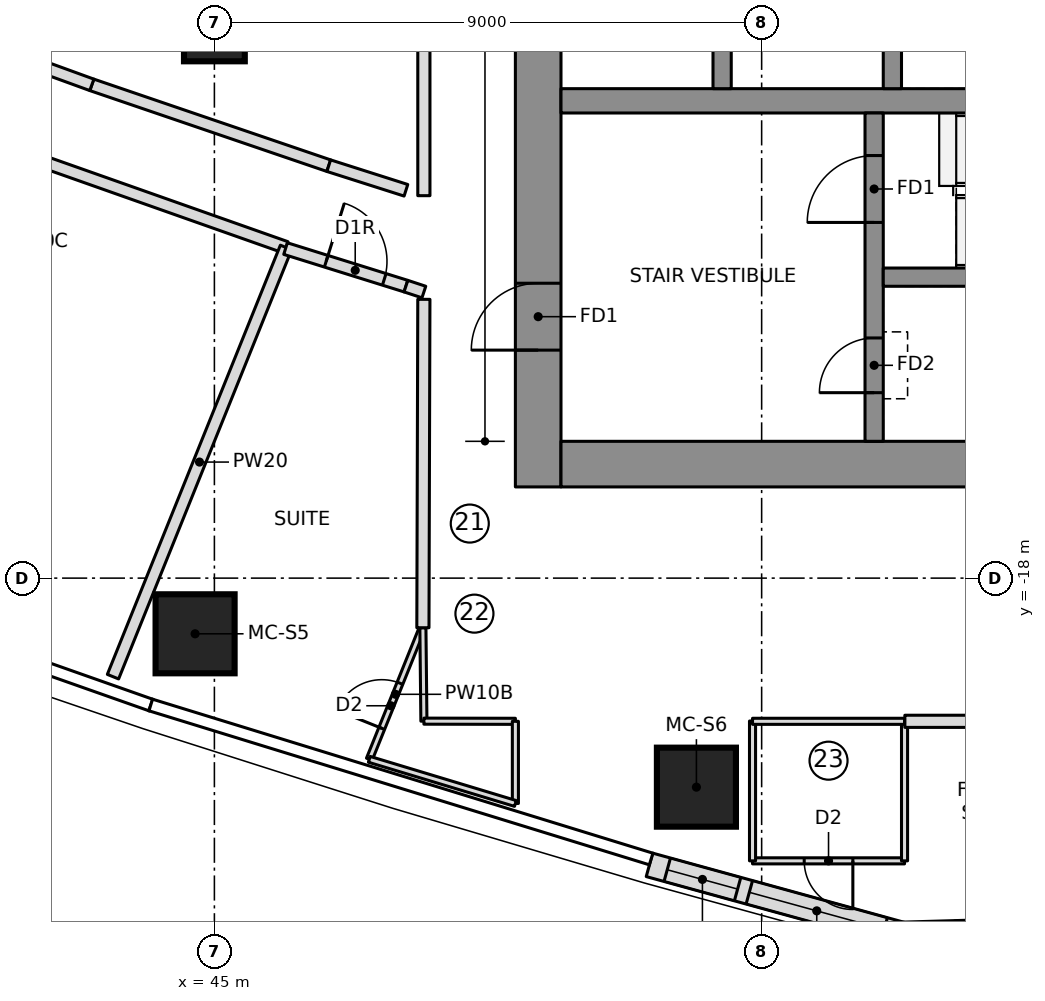
"""IFC4 building model, lengths in metres.
Left out: names, types, materials, properties, quantities, classifications, styles, units other than length and angle.
Written with IfcOpenShell. Run it as: python <this file> out.ifc"""

import sys

from ifc_helpers import new_model, si_unit, direction, frame, frame_2d, origin, origin_2d, place, context, subcontext, project, spatial, polyline, rectangle, outline, extrude, element, fill, save


model = new_model("IFC4")
c1 = context("Model", 3, precision=1e-05, world=origin(), true_north=direction((0.0, 1.0)))
c2 = subcontext(c1, "Body", "Model", "MODEL_VIEW")
j1 = project(units=[si_unit("LENGTHUNIT", "METRE"), si_unit("PLANEANGLEUNIT", "RADIAN")], contexts=[c1])
p1 = place(None, origin())
s1 = spatial("IfcSite", under=j1, at=p1, CompositionType="ELEMENT")
p2 = place(p1, origin())
s2 = spatial("IfcBuilding", under=s1, at=p2, CompositionType="ELEMENT")
p3 = place(p2, frame((0.0, 0.0, 196.8)))
s3 = spatial("IfcBuildingStorey", under=s2, at=p3, CompositionType="ELEMENT", Elevation=196.8)
p4 = place(p3, frame((50.325, -16.5, 0.0), z_axis=(0.0, 0.0, 1.0), x_axis=(0.0, 1.0, 0.0)))
e1 = element("IfcWall", 1, at=p4, inside=s3, PredefinedType="SHEAR", context=c2, shape_type="SweptSolid", body=[
    extrude(rectangle(XDim=9.85, YDim=0.75, at=frame_2d((4.925, 0.0))), origin(), (0.0, 0.0, 1.0), 3.55),
])
p5 = place(p4, frame((2.25, 0.0, 0.0)))
e2 = element("IfcOpeningElement", 2, at=p5, cuts=e1, PredefinedType="OPENING", context=c2, shape_type="SweptSolid", body=[
    extrude(rectangle(XDim=1.1, YDim=2.1, at=frame_2d((0.55, 1.05))), frame((0.0, 0.385, 0.0), z_axis=(0.0, -1.0, 0.0), x_axis=(1.0, 0.0, 0.0)), (0.0, 0.0, 1.0), 0.77),
])
p6 = place(p3, frame((50.7, -16.125, 0.0), z_axis=(0.0, 0.0, 1.0), x_axis=(1.0, 0.0, 0.0)))
e3 = element("IfcWall", 3, at=p6, inside=s3, PredefinedType="SHEAR", context=c2, shape_type="SweptSolid", body=[
    extrude(rectangle(XDim=13.77, YDim=0.75, at=frame_2d((6.885, 0.0))), origin(), (0.0, 0.0, 1.0), 3.55),
])
p7 = place(p3, frame((50.7, -10.15, 0.0), z_axis=(0.0, 0.0, 1.0), x_axis=(1.0, 0.0, 0.0)))
e4 = element("IfcWall", 4, at=p7, inside=s3, PredefinedType="SHEAR", context=c2, shape_type="SweptSolid", body=[
    extrude(rectangle(XDim=13.02, YDim=0.4, at=frame_2d((6.51, 0.0))), origin(), (0.0, 0.0, 1.0), 3.55),
])
for number, where, z_axis, x_axis in (
    (5, (53.35, -9.95, 0.0), (0.0, 0.0, 1.0), (0.0, 1.0, 0.0)),
    (6, (56.15, -9.95, 0.0), (0.0, 0.0, 1.0), (0.0, 1.0, 0.0)),
):
    element("IfcWall", number, at=place(p3, frame(where, z_axis=z_axis, x_axis=x_axis)), inside=s3, PredefinedType="SHEAR", context=c2, shape_type="SweptSolid", body=[
        extrude(rectangle(XDim=3.0, YDim=0.3, at=frame_2d((1.5, 0.0))), origin(), (0.0, 0.0, 1.0), 3.55),
    ])
p8 = place(p3, frame((55.85, -15.75, 0.0), z_axis=(0.0, 0.0, 1.0), x_axis=(0.0, 1.0, 0.0)))
e7 = element("IfcWall", 7, at=p8, inside=s3, PredefinedType="SHEAR", context=c2, shape_type="SweptSolid", body=[
    extrude(rectangle(XDim=5.4, YDim=0.3, at=frame_2d((2.7, 0.0))), origin(), (0.0, 0.0, 1.0), 3.55),
])
p9 = place(p8, frame((3.6, 0.0, 0.0)))
e8 = element("IfcOpeningElement", 8, at=p9, cuts=e7, PredefinedType="OPENING", context=c2, shape_type="SweptSolid", body=[
    extrude(rectangle(XDim=1.1, YDim=2.1, at=frame_2d((0.55, 1.05))), frame((0.0, 0.16, 0.0), z_axis=(0.0, -1.0, 0.0), x_axis=(1.0, 0.0, 0.0)), (0.0, 0.0, 1.0), 0.32),
])
p10 = place(p8, frame((0.8, 0.0, 0.0)))
e9 = element("IfcOpeningElement", 9, at=p10, cuts=e7, PredefinedType="OPENING", context=c2, shape_type="SweptSolid", body=[
    extrude(rectangle(XDim=0.9, YDim=2.1, at=frame_2d((0.45, 1.05))), frame((0.0, 0.16, 0.0), z_axis=(0.0, -1.0, 0.0), x_axis=(1.0, 0.0, 0.0)), (0.0, 0.0, 1.0), 0.32),
])
p11 = place(p3, frame((56.0, -13.05, 0.0), z_axis=(0.0, 0.0, 1.0), x_axis=(1.0, 0.0, 0.0)))
e10 = element("IfcWall", 10, at=p11, inside=s3, PredefinedType="SHEAR", context=c2, shape_type="SweptSolid", body=[
    extrude(rectangle(XDim=7.72, YDim=0.3, at=frame_2d((3.86, 0.0))), origin(), (0.0, 0.0, 1.0), 3.55),
])
for number, where, z_axis, x_axis in (
    (11, (44.683, -18.916, 0.0), (0.0, 0.0, 1.0), (1.0, 0.0, 0.0)),
    (12, (52.927, -21.438, 0.0), (0.0, 0.0, 1.0), (1.0, 0.0, 0.0)),
):
    element("IfcColumn", number, at=place(p3, frame(where, z_axis=z_axis, x_axis=x_axis)), inside=s3, PredefinedType="COLUMN", context=c2, shape_type="SweptSolid", body=[
        extrude(rectangle(XDim=1.3, YDim=1.3, at=origin_2d()), origin(), (0.0, 0.0, 1.0), 3.55),
    ])
p12 = place(p3, frame((45.0, -9.0, 0.0), z_axis=(0.0, 0.0, 1.0), x_axis=(1.0, 0.0, 0.0)))
e13 = element("IfcColumn", 13, at=p12, inside=s3, PredefinedType="COLUMN", context=c2, shape_type="SweptSolid", body=[
    extrude(rectangle(XDim=1.0, YDim=1.0, at=origin_2d()), origin(), (0.0, 0.0, 1.0), 3.55),
])
p13 = place(p3, frame((52.155, -22.716, 0.0), z_axis=(0.0, 0.0, 1.0), x_axis=(0.964205755089, -0.265155165617, 0.0)))
e14 = element("IfcWall", 14, at=p13, inside=s3, PredefinedType="NOTDEFINED", context=c2, shape_type="SweptSolid", body=[
    extrude(outline(polyline([(0.0, -0.2), (4.337, -0.2), (4.277, 0.2), (0.0, 0.2), (0.0, -0.2)])), origin(), (0.0, 0.0, 1.0), 3.25),
])
p14 = place(p13, frame((0.303, 0.0, 0.9)))
e15 = element("IfcOpeningElement", 15, at=p14, cuts=e14, PredefinedType="OPENING", context=c2, shape_type="SweptSolid", body=[
    extrude(rectangle(XDim=1.2, YDim=1.8, at=frame_2d((0.6, 0.9))), frame((0.0, 0.21, 0.0), z_axis=(0.0, -1.0, 0.0), x_axis=(1.0, 0.0, 0.0)), (0.0, 0.0, 1.0), 0.42),
])
p15 = place(p13, frame((1.704, 0.0, 0.9)))
e16 = element("IfcOpeningElement", 16, at=p15, cuts=e14, PredefinedType="OPENING", context=c2, shape_type="SweptSolid", body=[
    extrude(rectangle(XDim=2.3, YDim=1.8, at=frame_2d((1.15, 0.9))), frame((0.0, 0.21, 0.0), z_axis=(0.0, -1.0, 0.0), x_axis=(1.0, 0.0, 0.0)), (0.0, 0.0, 1.0), 0.42),
])
p16 = place(p3, frame((56.308, -23.858, 0.0), z_axis=(0.0, 0.0, 1.0), x_axis=(0.999587920197, 0.028705222472, 0.0)))
e17 = element("IfcWall", 17, at=p16, inside=s3, PredefinedType="NOTDEFINED", context=c2, shape_type="SweptSolid", body=[
    extrude(outline(polyline([(-0.03, -0.2), (3.989, -0.2), (3.87, 0.2), (0.03, 0.2), (-0.03, -0.2)])), origin(), (0.0, 0.0, 1.0), 3.25),
])
p17 = place(p16, frame((0.865, 0.0, 0.6)))
e18 = element("IfcOpeningElement", 18, at=p17, cuts=e17, PredefinedType="OPENING", context=c2, shape_type="SweptSolid", body=[
    extrude(outline(polyline([(0.0, 1.35), (0.084, 1.771), (0.322, 2.128), (0.679, 2.366), (1.1, 2.45), (1.521, 2.366), (1.878, 2.128), (2.116, 1.771), (2.2, 1.35), (2.2, 1.1), (2.116, 0.679), (1.878, 0.322), (1.521, 0.084), (1.1, 0.0), (0.679, 0.084), (0.322, 0.322), (0.084, 0.679), (0.0, 1.1), (0.0, 1.35)])), frame((0.0, 0.21, 0.0), z_axis=(0.0, -1.0, 0.0), x_axis=(1.0, 0.0, 0.0)), (0.0, 0.0, 1.0), 0.42),
])
p18 = place(p3, frame((56.35, -22.65, 0.0), z_axis=(0.0, 0.0, 1.0), x_axis=(-1.0, 0.0, 0.0)))
e19 = element("IfcWall", 19, at=p18, inside=s3, PredefinedType="PARTITIONING", context=c2, shape_type="SweptSolid", body=[
    extrude(rectangle(XDim=2.5, YDim=0.1, at=frame_2d((1.25, 0.0))), origin(), (0.0, 0.0, 1.0), 3.25),
])
p19 = place(p18, frame((0.85, 0.0, 0.0)))
e20 = element("IfcOpeningElement", 20, at=p19, cuts=e19, PredefinedType="OPENING", context=c2, shape_type="SweptSolid", body=[
    extrude(rectangle(XDim=0.8, YDim=2.1, at=frame_2d((0.4, 1.05))), frame((0.0, 0.06, 0.0), z_axis=(0.0, -1.0, 0.0), x_axis=(1.0, 0.0, 0.0)), (0.0, 0.0, 1.0), 0.12),
])
for number, where, z_axis, x_axis in (
    (21, (53.85, -22.65, 0.0), (0.0, 0.0, 1.0), (0.0, 1.0, 0.0)),
    (22, (56.35, -20.35, 0.0), (0.0, 0.0, 1.0), (0.0, -1.0, 0.0)),
):
    element("IfcWall", number, at=place(p3, frame(where, z_axis=z_axis, x_axis=x_axis)), inside=s3, PredefinedType="PARTITIONING", context=c2, shape_type="SweptSolid", body=[
        extrude(rectangle(XDim=2.3, YDim=0.1, at=frame_2d((1.15, 0.0))), origin(), (0.0, 0.0, 1.0), 3.25),
    ])
p20 = place(p3, frame((37.872, -9.628, 0.0), z_axis=(0.0, 0.0, 1.0), x_axis=(0.9429299378, -0.332991189675, 0.0)))
e23 = element("IfcWall", 23, at=p20, inside=s3, PredefinedType="PARTITIONING", context=c2, shape_type="SweptSolid", body=[
    extrude(rectangle(XDim=8.808, YDim=0.2, at=frame_2d((4.404, 0.0))), origin(), (0.0, 0.0, 1.0), 3.25),
])
p21 = place(p20, frame((3.05, 0.0, 0.0)))
e24 = element("IfcOpeningElement", 24, at=p21, cuts=e23, PredefinedType="OPENING", context=c2, shape_type="SweptSolid", body=[
    extrude(rectangle(XDim=1.5, YDim=2.1, at=frame_2d((0.75, 1.05))), frame((0.0, 0.11, 0.0), z_axis=(0.0, -1.0, 0.0), x_axis=(1.0, 0.0, 0.0)), (0.0, 0.0, 1.0), 0.22),
])
p22 = place(p3, frame((43.332, -19.621, 0.0), z_axis=(0.0, 0.0, 1.0), x_axis=(0.373905590149, 0.927466770108, 0.0)))
e25 = element("IfcWall", 25, at=p22, inside=s3, PredefinedType="PARTITIONING", context=c2, shape_type="SweptSolid", body=[
    extrude(rectangle(XDim=7.611, YDim=0.2, at=frame_2d((3.806, 0.0))), origin(), (0.0, 0.0, 1.0), 3.25),
])
p23 = place(p3, frame((47.547, -20.98, 0.0), z_axis=(0.0, 0.0, 1.0), x_axis=(0.373908119057, 0.927465750582, 0.0)))
e26 = element("IfcWall", 26, at=p23, inside=s3, PredefinedType="PARTITIONING", context=c2, shape_type="SweptSolid", body=[
    extrude(rectangle(XDim=2.306, YDim=0.1, at=frame_2d((1.153, 0.0))), origin(), (0.0, 0.0, 1.0), 3.25),
])
p24 = place(p23, frame((0.55, 0.0, 0.0)))
e27 = element("IfcOpeningElement", 27, at=p24, cuts=e26, PredefinedType="OPENING", context=c2, shape_type="SweptSolid", body=[
    extrude(rectangle(XDim=0.8, YDim=2.1, at=frame_2d((0.4, 1.05))), frame((0.0, 0.06, 0.0), z_axis=(0.0, -1.0, 0.0), x_axis=(1.0, 0.0, 0.0)), (0.0, 0.0, 1.0), 0.12),
])
p25 = place(p3, frame((46.881, -11.217, 0.0), z_axis=(0.0, 0.0, 1.0), x_axis=(-0.946436071896, 0.322891253852, 0.0)))
e28 = element("IfcWall", 28, at=p25, inside=s3, PredefinedType="PARTITIONING", context=c2, shape_type="SweptSolid", body=[
    extrude(rectangle(XDim=4.117, YDim=0.2, at=frame_2d((2.059, 0.0))), origin(), (0.0, 0.0, 1.0), 3.25),
])
p26 = place(p3, frame((42.984, -9.887, 0.0), z_axis=(0.0, 0.0, 1.0), x_axis=(-0.939726274687, 0.341927665833, 0.0)))
e29 = element("IfcWall", 29, at=p26, inside=s3, PredefinedType="PARTITIONING", context=c2, shape_type="SweptSolid", body=[
    extrude(rectangle(XDim=2.973, YDim=0.2, at=frame_2d((1.487, 0.0))), origin(), (0.0, 0.0, 1.0), 3.25),
])
p27 = place(p3, frame((56.355, -20.355, 0.0), z_axis=(0.0, 0.0, 1.0), x_axis=(1.0, 0.0, 0.0)))
e30 = element("IfcWall", 30, at=p27, inside=s3, PredefinedType="PARTITIONING", context=c2, shape_type="SweptSolid", body=[
    extrude(rectangle(XDim=7.354, YDim=0.2, at=frame_2d((3.677, 0.0))), origin(), (0.0, 0.0, 1.0), 3.25),
])
p28 = place(p27, frame((2.624, 0.0, 0.0)))
e31 = element("IfcOpeningElement", 31, at=p28, cuts=e30, PredefinedType="OPENING", context=c2, shape_type="SweptSolid", body=[
    extrude(rectangle(XDim=1.5, YDim=2.1, at=frame_2d((0.75, 1.05))), frame((0.0, 0.11, 0.0), z_axis=(0.0, -1.0, 0.0), x_axis=(1.0, 0.0, 0.0)), (0.0, 0.0, 1.0), 0.22),
])
p29 = place(p3, frame((53.85, -20.355, 0.0), z_axis=(0.0, 0.0, 1.0), x_axis=(1.0, 0.0, 0.0)))
e32 = element("IfcWall", 32, at=p29, inside=s3, PredefinedType="PARTITIONING", context=c2, shape_type="SweptSolid", body=[
    extrude(rectangle(XDim=2.5, YDim=0.1, at=frame_2d((1.25, 0.0))), origin(), (0.0, 0.0, 1.0), 3.25),
])
p30 = place(p3, frame((48.429, -18.816, 0.0), z_axis=(0.0, 0.0, 1.0), x_axis=(0.010805026288, -0.999941624, 0.0)))
e33 = element("IfcWall", 33, at=p30, inside=s3, PredefinedType="PARTITIONING", context=c2, shape_type="SweptSolid", body=[
    extrude(rectangle(XDim=1.536, YDim=0.1, at=frame_2d((0.768, 0.0))), origin(), (0.0, 0.0, 1.0), 3.25),
])
p31 = place(p3, frame((48.446, -20.352, 0.0), z_axis=(0.0, 0.0, 1.0), x_axis=(0.999998406651, -0.001785131852, 0.0)))
e34 = element("IfcWall", 34, at=p31, inside=s3, PredefinedType="PARTITIONING", context=c2, shape_type="SweptSolid", body=[
    extrude(rectangle(XDim=1.504, YDim=0.1, at=frame_2d((0.752, 0.0))), origin(), (0.0, 0.0, 1.0), 3.25),
])
p32 = place(p3, frame((49.95, -20.355, 0.0), z_axis=(0.0, 0.0, 1.0), x_axis=(0.0, -1.0, 0.0)))
e35 = element("IfcWall", 35, at=p32, inside=s3, PredefinedType="PARTITIONING", context=c2, shape_type="SweptSolid", body=[
    extrude(rectangle(XDim=1.351, YDim=0.1, at=frame_2d((0.676, 0.0))), origin(), (0.0, 0.0, 1.0), 3.25),
])
p33 = place(p3, frame((49.95, -21.706, 0.0), z_axis=(0.0, 0.0, 1.0), x_axis=(-0.957251518155, 0.289256859885, 0.0)))
e36 = element("IfcWall", 36, at=p33, inside=s3, PredefinedType="PARTITIONING", context=c2, shape_type="SweptSolid", body=[
    extrude(rectangle(XDim=2.51, YDim=0.1, at=frame_2d((1.255, 0.0))), origin(), (0.0, 0.0, 1.0), 3.25),
])
p34 = place(p3, frame((46.17, -12.58, 0.0), z_axis=(0.0, 0.0, 1.0), x_axis=(0.954639063921, -0.297765440634, 0.0)))
e37 = element("IfcWall", 37, at=p34, inside=s3, PredefinedType="PARTITIONING", context=c2, shape_type="SweptSolid", body=[
    extrude(rectangle(XDim=2.073, YDim=0.2, at=frame_2d((1.037, 0.0))), origin(), (0.0, 0.0, 1.0), 3.25),
])
p35 = place(p34, frame((0.7, 0.0, 0.0)))
e38 = element("IfcOpeningElement", 38, at=p35, cuts=e37, PredefinedType="OPENING", context=c2, shape_type="SweptSolid", body=[
    extrude(rectangle(XDim=1.0, YDim=2.1, at=frame_2d((0.5, 1.05))), frame((0.0, 0.11, 0.0), z_axis=(0.0, -1.0, 0.0), x_axis=(1.0, 0.0, 0.0)), (0.0, 0.0, 1.0), 0.22),
])
p36 = place(p3, frame((48.15, -11.621, 0.0), z_axis=(0.0, 0.0, 1.0), x_axis=(-0.952761948983, 0.303718074157, 0.0)))
e39 = element("IfcWall", 39, at=p36, inside=s3, PredefinedType="PARTITIONING", context=c2, shape_type="SweptSolid", body=[
    extrude(rectangle(XDim=1.332, YDim=0.2, at=frame_2d((0.666, 0.0))), origin(), (0.0, 0.0, 1.0), 3.25),
])
p37 = place(p3, frame((48.445, 11.71, 0.0), z_axis=(0.0, 0.0, 1.0), x_axis=(0.0, -1.0, 0.0)))
e40 = element("IfcWall", 40, at=p37, inside=s3, PredefinedType="PARTITIONING", context=c2, shape_type="SweptSolid", body=[
    extrude(rectangle(XDim=23.42, YDim=0.2, at=frame_2d((11.71, 0.0))), origin(), (0.0, 0.0, 1.0), 3.25),
])
p38 = place(p3, frame((48.15, -13.198, 0.0), z_axis=(0.0, 0.0, 1.0), x_axis=(0.949621636458, -0.313398703843, 0.0)))
e41 = element("IfcWall", 41, at=p38, inside=s3, PredefinedType="PARTITIONING", context=c2, shape_type="SweptSolid", body=[
    extrude(rectangle(XDim=0.311, YDim=0.2, at=frame_2d((0.155, 0.0))), origin(), (0.0, 0.0, 1.0), 3.25),
])
p39 = place(p3, frame((48.445, -13.415, 0.0), z_axis=(0.0, 0.0, 1.0), x_axis=(-0.002938106018, -0.999995683757, 0.0)))
e42 = element("IfcWall", 42, at=p39, inside=s3, PredefinedType="PARTITIONING", context=c2, shape_type="SweptSolid", body=[
    extrude(rectangle(XDim=5.401, YDim=0.2, at=frame_2d((2.701, 0.0))), origin(), (0.0, 0.0, 1.0), 3.25),
])
p40 = place(p14, origin())
e43 = element("IfcWindow", 43, at=p40, inside=s3, PartitioningType="SINGLE_PANEL", PredefinedType="WINDOW", context=c2, shape_type="SweptSolid", body=[
    extrude(rectangle(XDim=1.2, YDim=1.8, at=frame_2d((0.6, 0.9))), frame((0.0, 0.17, 0.0), z_axis=(0.0, -1.0, 0.0), x_axis=(1.0, 0.0, 0.0)), (0.0, 0.0, 1.0), 0.06),
])
fill(e15, e43)
p41 = place(p15, origin())
e44 = element("IfcWindow", 44, at=p41, inside=s3, PartitioningType="SINGLE_PANEL", PredefinedType="WINDOW", context=c2, shape_type="SweptSolid", body=[
    extrude(rectangle(XDim=2.3, YDim=1.8, at=frame_2d((1.15, 0.9))), frame((0.0, 0.17, 0.0), z_axis=(0.0, -1.0, 0.0), x_axis=(1.0, 0.0, 0.0)), (0.0, 0.0, 1.0), 0.06),
])
fill(e16, e44)
p42 = place(p17, origin())
e45 = element("IfcWindow", 45, at=p42, inside=s3, PartitioningType="SINGLE_PANEL", PredefinedType="WINDOW", context=c2, shape_type="SweptSolid", body=[
    extrude(outline(polyline([(0.0, 1.35), (0.084, 1.771), (0.322, 2.128), (0.679, 2.366), (1.1, 2.45), (1.521, 2.366), (1.878, 2.128), (2.116, 1.771), (2.2, 1.35), (2.2, 1.1), (2.116, 0.679), (1.878, 0.322), (1.521, 0.084), (1.1, 0.0), (0.679, 0.084), (0.322, 0.322), (0.084, 0.679), (0.0, 1.1), (0.0, 1.35)])), frame((0.0, 0.17, 0.0), z_axis=(0.0, -1.0, 0.0), x_axis=(1.0, 0.0, 0.0)), (0.0, 0.0, 1.0), 0.06),
])
fill(e18, e45)
p43 = place(p19, origin())
e46 = element("IfcDoor", 46, at=p43, inside=s3, OperationType="SINGLE_SWING_LEFT", PredefinedType="DOOR", context=c2, shape_type="SweptSolid", body=[
    extrude(rectangle(XDim=0.8, YDim=2.1, at=frame_2d((0.4, 1.05))), frame((0.0, 0.025, 0.0), z_axis=(0.0, -1.0, 0.0), x_axis=(1.0, 0.0, 0.0)), (0.0, 0.0, 1.0), 0.05),
])
fill(e20, e46)
p44 = place(p24, origin())
e47 = element("IfcDoor", 47, at=p44, inside=s3, OperationType="SINGLE_SWING_LEFT", PredefinedType="DOOR", context=c2, shape_type="SweptSolid", body=[
    extrude(rectangle(XDim=0.8, YDim=2.1, at=frame_2d((0.4, 1.05))), frame((0.0, 0.025, 0.0), z_axis=(0.0, -1.0, 0.0), x_axis=(1.0, 0.0, 0.0)), (0.0, 0.0, 1.0), 0.05),
])
fill(e27, e47)
p45 = place(p35, origin())
e48 = element("IfcDoor", 48, at=p45, inside=s3, OperationType="SINGLE_SWING_RIGHT", PredefinedType="DOOR", context=c2, shape_type="SweptSolid", body=[
    extrude(rectangle(XDim=1.0, YDim=2.1, at=frame_2d((0.5, 1.05))), frame((0.0, 0.025, 0.0), z_axis=(0.0, -1.0, 0.0), x_axis=(1.0, 0.0, 0.0)), (0.0, 0.0, 1.0), 0.05),
])
fill(e38, e48)
p46 = place(p9, origin())
e49 = element("IfcDoor", 49, at=p46, inside=s3, OperationType="SINGLE_SWING_RIGHT", PredefinedType="DOOR", context=c2, shape_type="SweptSolid", body=[
    extrude(rectangle(XDim=1.1, YDim=2.1, at=frame_2d((0.55, 1.05))), frame((0.0, 0.025, 0.0), z_axis=(0.0, -1.0, 0.0), x_axis=(1.0, 0.0, 0.0)), (0.0, 0.0, 1.0), 0.05),
])
fill(e8, e49)
p47 = place(p5, origin())
e50 = element("IfcDoor", 50, at=p47, inside=s3, OperationType="SINGLE_SWING_RIGHT", PredefinedType="DOOR", context=c2, shape_type="SweptSolid", body=[
    extrude(rectangle(XDim=1.1, YDim=2.1, at=frame_2d((0.55, 1.05))), frame((0.0, 0.025, 0.0), z_axis=(0.0, -1.0, 0.0), x_axis=(1.0, 0.0, 0.0)), (0.0, 0.0, 1.0), 0.05),
])
fill(e2, e50)
p48 = place(p10, origin())
e51 = element("IfcDoor", 51, at=p48, inside=s3, OperationType="SINGLE_SWING_LEFT", PredefinedType="DOOR", context=c2, shape_type="SweptSolid", body=[
    extrude(rectangle(XDim=0.9, YDim=2.1, at=frame_2d((0.45, 1.05))), frame((0.0, 0.025, 0.0), z_axis=(0.0, -1.0, 0.0), x_axis=(1.0, 0.0, 0.0)), (0.0, 0.0, 1.0), 0.05),
])
fill(e9, e51)
save(model, sys.argv[1])
